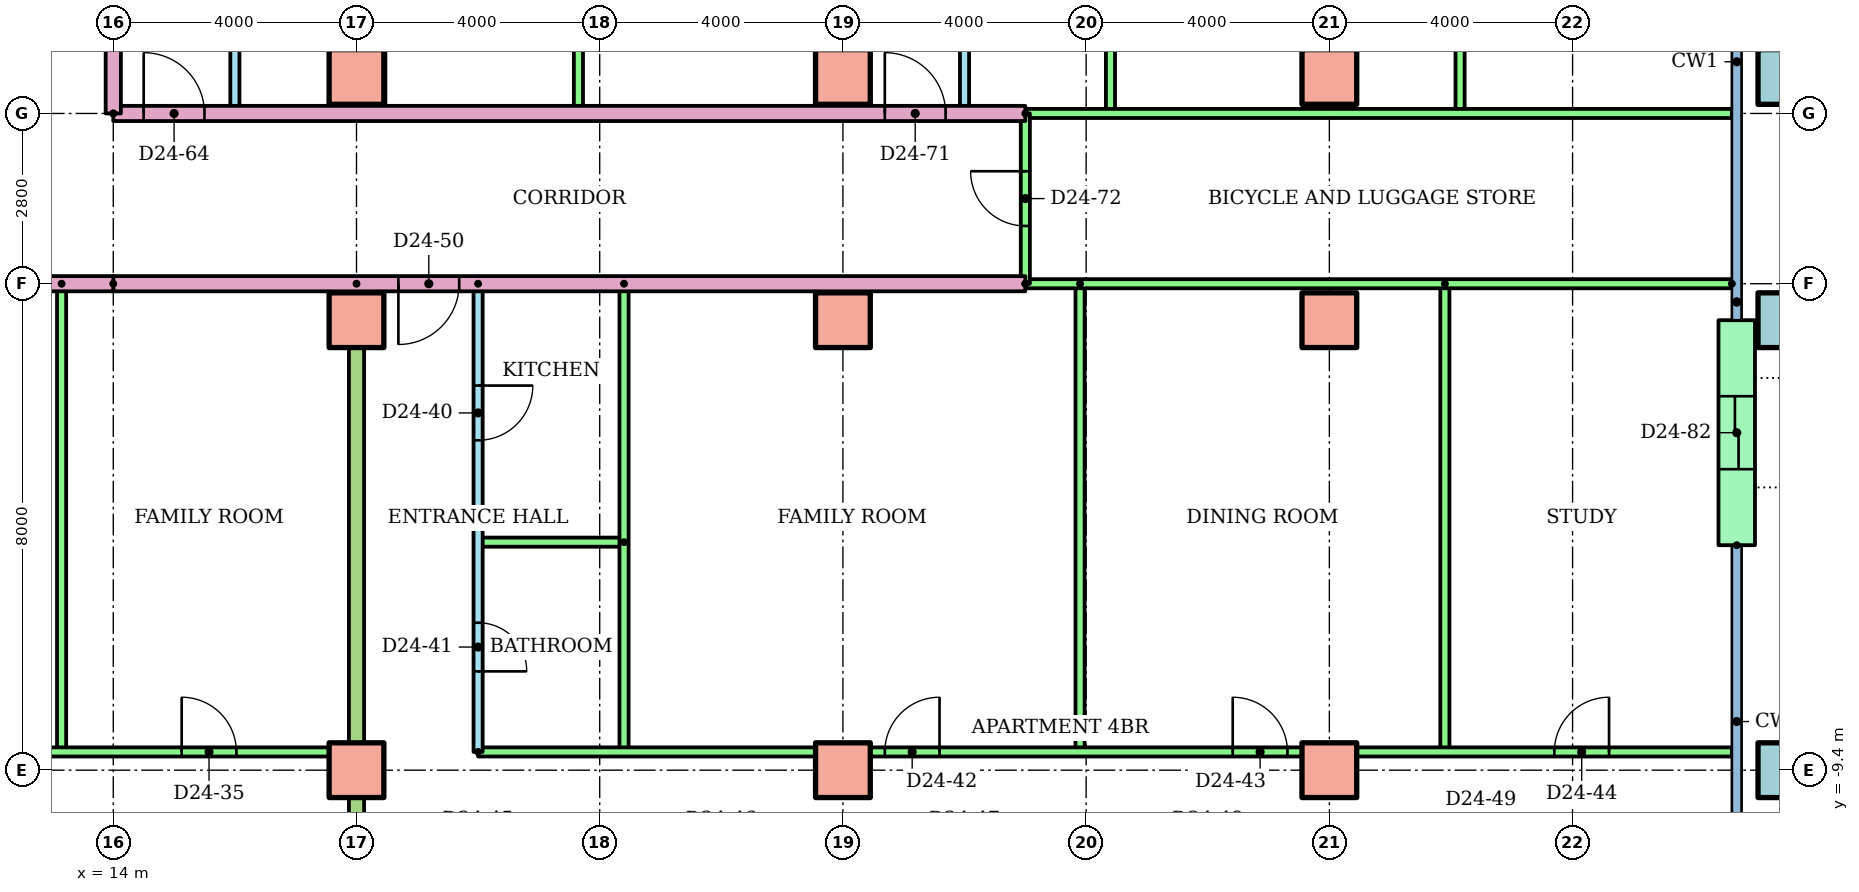
"""IFC4 building model, lengths in metres.
Left out: names, types, materials, properties, quantities, classifications, styles, units other than length and angle.
Written with IfcOpenShell. Run it as: python <this file> out.ifc"""

import sys

from ifc_helpers import new_model, si_unit, direction, frame, frame_2d, origin, origin_2d, place, context, subcontext, project, spatial, rectangle, hollow_rectangle, extrude, element, fill, save


model = new_model("IFC4")
c1 = context("Model", 3, precision=1e-05, world=origin(), true_north=direction((0.0, 1.0)))
c2 = subcontext(c1, "Body", "Model", "MODEL_VIEW")
j1 = project(units=[si_unit("LENGTHUNIT", "METRE"), si_unit("PLANEANGLEUNIT", "RADIAN")], contexts=[c1])
p1 = place(None, origin())
s1 = spatial("IfcSite", under=j1, at=p1, CompositionType="ELEMENT")
p2 = place(p1, origin())
s2 = spatial("IfcBuilding", under=s1, at=p2, CompositionType="ELEMENT")
p3 = place(p2, frame((0.0, 0.0, 93.5)))
s3 = spatial("IfcBuildingStorey", under=s2, at=p3, CompositionType="ELEMENT", Elevation=93.5)
for number, where in (
    (1, (18.0, -9.4, 0.0)),
    (2, (26.0, -9.4, 0.0)),
    (3, (34.0, -9.4, 0.0)),
):
    element("IfcColumn", number, at=place(p3, frame(where)), inside=s3, PredefinedType="COLUMN", context=c2, shape_type="SweptSolid", body=[
        extrude(rectangle(XDim=0.9, YDim=0.9, at=origin_2d()), origin(), (0.0, 0.0, 1.0), 3.2),
    ])
p4 = place(p3, frame((41.5, -9.4, 0.0)))
e4 = element("IfcColumn", 4, at=p4, inside=s3, PredefinedType="COLUMN", context=c2, shape_type="SweptSolid", body=[
    extrude(hollow_rectangle(XDim=0.9, YDim=0.9, WallThickness=0.045, at=origin_2d()), origin(), (0.0, 0.0, 1.0), 3.2),
])
for number, where in (
    (5, (18.0, -2.0, 0.0)),
    (6, (26.0, -2.0, 0.0)),
    (7, (34.0, -2.0, 0.0)),
):
    element("IfcColumn", number, at=place(p3, frame(where)), inside=s3, PredefinedType="COLUMN", context=c2, shape_type="SweptSolid", body=[
        extrude(rectangle(XDim=0.9, YDim=0.9, at=origin_2d()), origin(), (0.0, 0.0, 1.0), 3.2),
    ])
p5 = place(p3, frame((41.5, -2.0, 0.0)))
e8 = element("IfcColumn", 8, at=p5, inside=s3, PredefinedType="COLUMN", context=c2, shape_type="SweptSolid", body=[
    extrude(hollow_rectangle(XDim=0.9, YDim=0.9, WallThickness=0.045, at=origin_2d()), origin(), (0.0, 0.0, 1.0), 3.2),
])
for number, where in (
    (9, (18.0, 2.0, 0.0)),
    (10, (26.0, 2.0, 0.0)),
    (11, (34.0, 2.0, 0.0)),
):
    element("IfcColumn", number, at=place(p3, frame(where)), inside=s3, PredefinedType="COLUMN", context=c2, shape_type="SweptSolid", body=[
        extrude(rectangle(XDim=0.9, YDim=0.9, at=origin_2d()), origin(), (0.0, 0.0, 1.0), 3.2),
    ])
p6 = place(p3, frame((41.5, 2.0, 0.0)))
e12 = element("IfcColumn", 12, at=p6, inside=s3, PredefinedType="COLUMN", context=c2, shape_type="SweptSolid", body=[
    extrude(hollow_rectangle(XDim=0.9, YDim=0.9, WallThickness=0.045, at=origin_2d()), origin(), (0.0, 0.0, 1.0), 3.2),
])
p7 = place(p3, frame((40.7, -5.7, 0.0), z_axis=(0.0, 0.0, 1.0), x_axis=(0.0, 1.0, 0.0)))
e13 = element("IfcWall", 13, at=p7, inside=s3, PredefinedType="STANDARD", context=c2, shape_type="SweptSolid", body=[
    extrude(rectangle(XDim=3.7, YDim=0.6, at=frame_2d((1.85, 0.0))), origin(), (0.0, 0.0, 1.0), 2.92),
])
p8 = place(p7, frame((1.25, 0.0, 0.0)))
e14 = element("IfcOpeningElement", 14, at=p8, cuts=e13, PredefinedType="OPENING", context=c2, shape_type="SweptSolid", body=[
    extrude(rectangle(XDim=1.2, YDim=2.1, at=frame_2d((0.6, 1.05))), frame((0.0, 0.31, 0.0), z_axis=(0.0, -1.0, 0.0), x_axis=(1.0, 0.0, 0.0)), (0.0, 0.0, 1.0), 0.62),
])
p9 = place(p3, frame((13.15, -1.4, 0.0), z_axis=(0.0, 0.0, 1.0), x_axis=(0.0, -1.0, 0.0)))
e15 = element("IfcWall", 15, at=p9, inside=s3, PredefinedType="PARTITIONING", context=c2, shape_type="SweptSolid", body=[
    extrude(rectangle(XDim=7.7, YDim=0.15, at=frame_2d((3.85, 0.0))), origin(), (0.0, 0.0, 1.0), 2.4),
])
p10 = place(p3, frame((4.0, -9.1, 0.0)))
e16 = element("IfcWall", 16, at=p10, inside=s3, PredefinedType="PARTITIONING", context=c2, shape_type="SweptSolid", body=[
    extrude(rectangle(XDim=14.0, YDim=0.15, at=frame_2d((7.0, 0.0))), origin(), (0.0, 0.0, 1.0), 2.4),
])
p11 = place(p10, frame((3.45, 0.0, 0.0)))
e17 = element("IfcOpeningElement", 17, at=p11, cuts=e16, PredefinedType="OPENING", context=c2, shape_type="SweptSolid", body=[
    extrude(rectangle(XDim=0.9, YDim=2.1, at=frame_2d((0.45, 1.05))), frame((0.0, 0.085, 0.0), z_axis=(0.0, -1.0, 0.0), x_axis=(1.0, 0.0, 0.0)), (0.0, 0.0, 1.0), 0.17),
])
p12 = place(p10, frame((6.825, 0.0, 0.0)))
e18 = element("IfcOpeningElement", 18, at=p12, cuts=e16, PredefinedType="OPENING", context=c2, shape_type="SweptSolid", body=[
    extrude(rectangle(XDim=0.9, YDim=2.1, at=frame_2d((0.45, 1.05))), frame((0.0, 0.085, 0.0), z_axis=(0.0, -1.0, 0.0), x_axis=(1.0, 0.0, 0.0)), (0.0, 0.0, 1.0), 0.17),
])
p13 = place(p10, frame((11.125, 0.0, 0.0)))
e19 = element("IfcOpeningElement", 19, at=p13, cuts=e16, PredefinedType="OPENING", context=c2, shape_type="SweptSolid", body=[
    extrude(rectangle(XDim=0.9, YDim=2.1, at=frame_2d((0.45, 1.05))), frame((0.0, 0.085, 0.0), z_axis=(0.0, -1.0, 0.0), x_axis=(1.0, 0.0, 0.0)), (0.0, 0.0, 1.0), 0.17),
])
p14 = place(p3, frame((20.0, -1.4, 0.0), z_axis=(0.0, 0.0, 1.0), x_axis=(0.0, -1.0, 0.0)))
e20 = element("IfcWall", 20, at=p14, inside=s3, PredefinedType="PARTITIONING", context=c2, shape_type="SweptSolid", body=[
    extrude(rectangle(XDim=7.7, YDim=0.15, at=frame_2d((3.85, 0.0))), origin(), (0.0, 0.0, 1.0), 2.4),
])
p15 = place(p14, frame((1.675, 0.0, 0.0)))
e21 = element("IfcOpeningElement", 21, at=p15, cuts=e20, PredefinedType="OPENING", context=c2, shape_type="SweptSolid", body=[
    extrude(rectangle(XDim=0.9, YDim=2.1, at=frame_2d((0.45, 1.05))), frame((0.0, 0.085, 0.0), z_axis=(0.0, -1.0, 0.0), x_axis=(1.0, 0.0, 0.0)), (0.0, 0.0, 1.0), 0.17),
])
p16 = place(p14, frame((5.575, 0.0, 0.0)))
e22 = element("IfcOpeningElement", 22, at=p16, cuts=e20, PredefinedType="OPENING", context=c2, shape_type="SweptSolid", body=[
    extrude(rectangle(XDim=0.8, YDim=2.1, at=frame_2d((0.4, 1.05))), frame((0.0, 0.085, 0.0), z_axis=(0.0, -1.0, 0.0), x_axis=(1.0, 0.0, 0.0)), (0.0, 0.0, 1.0), 0.17),
])
p17 = place(p3, frame((22.4, -5.65, 0.0), z_axis=(0.0, 0.0, 1.0), x_axis=(-1.0, 0.0, 0.0)))
e23 = element("IfcWall", 23, at=p17, inside=s3, PredefinedType="PARTITIONING", context=c2, shape_type="SweptSolid", body=[
    extrude(rectangle(XDim=2.4, YDim=0.15, at=frame_2d((1.2, 0.0))), origin(), (0.0, 0.0, 1.0), 2.4),
])
for number, where, z_axis, x_axis in (
    (24, (22.4, -1.4, 0.0), (0.0, 0.0, 1.0), (0.0, -1.0, 0.0)),
    (25, (29.9, -1.4, 0.0), (0.0, 0.0, 1.0), (0.0, -1.0, 0.0)),
    (26, (35.9, -1.4, 0.0), (0.0, 0.0, 1.0), (0.0, -1.0, 0.0)),
):
    element("IfcWall", number, at=place(p3, frame(where, z_axis=z_axis, x_axis=x_axis)), inside=s3, PredefinedType="PARTITIONING", context=c2, shape_type="SweptSolid", body=[
        extrude(rectangle(XDim=7.7, YDim=0.15, at=frame_2d((3.85, 0.0))), origin(), (0.0, 0.0, 1.0), 2.4),
    ])
p18 = place(p3, frame((20.0, -9.1, 0.0)))
e27 = element("IfcWall", 27, at=p18, inside=s3, PredefinedType="PARTITIONING", context=c2, shape_type="SweptSolid", body=[
    extrude(rectangle(XDim=20.62, YDim=0.15, at=frame_2d((10.31, 0.0))), origin(), (0.0, 0.0, 1.0), 2.4),
])
p19 = place(p18, frame((6.689, 0.0, 0.0)))
e28 = element("IfcOpeningElement", 28, at=p19, cuts=e27, PredefinedType="OPENING", context=c2, shape_type="SweptSolid", body=[
    extrude(rectangle(XDim=0.9, YDim=2.1, at=frame_2d((0.45, 1.05))), frame((0.0, 0.085, 0.0), z_axis=(0.0, -1.0, 0.0), x_axis=(1.0, 0.0, 0.0)), (0.0, 0.0, 1.0), 0.17),
])
p20 = place(p18, frame((12.411, 0.0, 0.0)))
e29 = element("IfcOpeningElement", 29, at=p20, cuts=e27, PredefinedType="OPENING", context=c2, shape_type="SweptSolid", body=[
    extrude(rectangle(XDim=0.9, YDim=2.1, at=frame_2d((0.45, 1.05))), frame((0.0, 0.085, 0.0), z_axis=(0.0, -1.0, 0.0), x_axis=(1.0, 0.0, 0.0)), (0.0, 0.0, 1.0), 0.17),
])
p21 = place(p18, frame((17.7, 0.0, 0.0)))
e30 = element("IfcOpeningElement", 30, at=p21, cuts=e27, PredefinedType="OPENING", context=c2, shape_type="SweptSolid", body=[
    extrude(rectangle(XDim=0.9, YDim=2.1, at=frame_2d((0.45, 1.05))), frame((0.0, 0.085, 0.0), z_axis=(0.0, -1.0, 0.0), x_axis=(1.0, 0.0, 0.0)), (0.0, 0.0, 1.0), 0.17),
])
p22 = place(p3, frame((18.0, -1.4, 0.0), z_axis=(0.0, 0.0, 1.0), x_axis=(0.0, -1.0, 0.0)))
e31 = element("IfcWall", 31, at=p22, inside=s3, PredefinedType="PARTITIONING", context=c2, shape_type="SweptSolid", body=[
    extrude(rectangle(XDim=14.81, YDim=0.25, at=frame_2d((7.405, 0.0))), origin(), (0.0, 0.0, 1.0), 2.4),
])
p23 = place(p3, frame((29.0, -1.4, 0.0), z_axis=(0.0, 0.0, 1.0), x_axis=(-1.0, 0.0, 0.0)))
e32 = element("IfcWall", 32, at=p23, inside=s3, PredefinedType="PARTITIONING", context=c2, shape_type="SweptSolid", body=[
    extrude(rectangle(XDim=15.0, YDim=0.25, at=frame_2d((7.5, 0.0))), origin(), (0.0, 0.0, 1.0), 2.4),
])
p24 = place(p23, frame((9.311, 0.0, 0.0)))
e33 = element("IfcOpeningElement", 33, at=p24, cuts=e32, PredefinedType="OPENING", context=c2, shape_type="SweptSolid", body=[
    extrude(rectangle(XDim=1.0, YDim=2.1, at=frame_2d((0.5, 1.05))), frame((0.0, 0.135, 0.0), z_axis=(0.0, -1.0, 0.0), x_axis=(1.0, 0.0, 0.0)), (0.0, 0.0, 1.0), 0.27),
])
p25 = place(p3, frame((40.62, -1.4, 0.0), z_axis=(0.0, 0.0, 1.0), x_axis=(-1.0, 0.0, 0.0)))
e34 = element("IfcWall", 34, at=p25, inside=s3, PredefinedType="PARTITIONING", context=c2, shape_type="SweptSolid", body=[
    extrude(rectangle(XDim=11.62, YDim=0.15, at=frame_2d((5.81, 0.0))), origin(), (0.0, 0.0, 1.0), 2.4),
])
p26 = place(p3, frame((16.0, 11.5, 0.0), z_axis=(0.0, 0.0, 1.0), x_axis=(0.0, -1.0, 0.0)))
e35 = element("IfcWall", 35, at=p26, inside=s3, PredefinedType="PARTITIONING", context=c2, shape_type="SweptSolid", body=[
    extrude(rectangle(XDim=10.1, YDim=0.15, at=frame_2d((5.05, 0.0))), origin(), (0.0, 0.0, 1.0), 2.4),
])
p27 = place(p26, frame((6.9, 0.0, 0.0)))
e36 = element("IfcOpeningElement", 36, at=p27, cuts=e35, PredefinedType="OPENING", context=c2, shape_type="SweptSolid", body=[
    extrude(rectangle(XDim=0.9, YDim=2.1, at=frame_2d((0.45, 1.05))), frame((0.0, 0.085, 0.0), z_axis=(0.0, -1.0, 0.0), x_axis=(1.0, 0.0, 0.0)), (0.0, 0.0, 1.0), 0.17),
])
p28 = place(p26, frame((1.9, 0.0, 0.0)))
e37 = element("IfcOpeningElement", 37, at=p28, cuts=e35, PredefinedType="OPENING", context=c2, shape_type="SweptSolid", body=[
    extrude(rectangle(XDim=0.8, YDim=2.1, at=frame_2d((0.4, 1.05))), frame((0.0, 0.085, 0.0), z_axis=(0.0, -1.0, 0.0), x_axis=(1.0, 0.0, 0.0)), (0.0, 0.0, 1.0), 0.17),
])
for number, where, z_axis, x_axis in (
    (38, (18.4, 11.5, 0.0), (0.0, 0.0, 1.0), (0.0, -1.0, 0.0)),
    (39, (21.65, 11.5, 0.0), (0.0, 0.0, 1.0), (0.0, -1.0, 0.0)),
):
    element("IfcWall", number, at=place(p3, frame(where, z_axis=z_axis, x_axis=x_axis)), inside=s3, PredefinedType="PARTITIONING", context=c2, shape_type="SweptSolid", body=[
        extrude(rectangle(XDim=10.1, YDim=0.15, at=frame_2d((5.05, 0.0))), origin(), (0.0, 0.0, 1.0), 2.4),
    ])
p29 = place(p3, frame((28.0, 11.5, 0.0), z_axis=(0.0, 0.0, 1.0), x_axis=(0.0, -1.0, 0.0)))
e40 = element("IfcWall", 40, at=p29, inside=s3, PredefinedType="PARTITIONING", context=c2, shape_type="SweptSolid", body=[
    extrude(rectangle(XDim=10.1, YDim=0.15, at=frame_2d((5.05, 0.0))), origin(), (0.0, 0.0, 1.0), 2.4),
])
p30 = place(p29, frame((6.9, 0.0, 0.0)))
e41 = element("IfcOpeningElement", 41, at=p30, cuts=e40, PredefinedType="OPENING", context=c2, shape_type="SweptSolid", body=[
    extrude(rectangle(XDim=0.9, YDim=2.1, at=frame_2d((0.45, 1.05))), frame((0.0, 0.085, 0.0), z_axis=(0.0, -1.0, 0.0), x_axis=(1.0, 0.0, 0.0)), (0.0, 0.0, 1.0), 0.17),
])
p31 = place(p29, frame((1.9, 0.0, 0.0)))
e42 = element("IfcOpeningElement", 42, at=p31, cuts=e40, PredefinedType="OPENING", context=c2, shape_type="SweptSolid", body=[
    extrude(rectangle(XDim=0.8, YDim=2.1, at=frame_2d((0.4, 1.05))), frame((0.0, 0.085, 0.0), z_axis=(0.0, -1.0, 0.0), x_axis=(1.0, 0.0, 0.0)), (0.0, 0.0, 1.0), 0.17),
])
for number, where, z_axis, x_axis in (
    (43, (30.4, 11.5, 0.0), (0.0, 0.0, 1.0), (0.0, -1.0, 0.0)),
    (44, (36.15, 11.5, 0.0), (0.0, 0.0, 1.0), (0.0, -1.0, 0.0)),
):
    element("IfcWall", number, at=place(p3, frame(where, z_axis=z_axis, x_axis=x_axis)), inside=s3, PredefinedType="PARTITIONING", context=c2, shape_type="SweptSolid", body=[
        extrude(rectangle(XDim=10.1, YDim=0.15, at=frame_2d((5.05, 0.0))), origin(), (0.0, 0.0, 1.0), 2.4),
    ])
p32 = place(p3, frame((26.0, 18.621, 0.0), z_axis=(0.0, 0.0, 1.0), x_axis=(0.0, -1.0, 0.0)))
e45 = element("IfcWall", 45, at=p32, inside=s3, PredefinedType="PARTITIONING", context=c2, shape_type="SweptSolid", body=[
    extrude(rectangle(XDim=17.221, YDim=0.25, at=frame_2d((8.611, 0.0))), origin(), (0.0, 0.0, 1.0), 2.4),
])
p33 = place(p3, frame((14.0, 1.4, 0.0)))
e46 = element("IfcWall", 46, at=p33, inside=s3, PredefinedType="PARTITIONING", context=c2, shape_type="SweptSolid", body=[
    extrude(rectangle(XDim=15.0, YDim=0.25, at=frame_2d((7.5, 0.0))), origin(), (0.0, 0.0, 1.0), 2.4),
])
p34 = place(p33, frame((0.5, 0.0, 0.0)))
e47 = element("IfcOpeningElement", 47, at=p34, cuts=e46, PredefinedType="OPENING", context=c2, shape_type="SweptSolid", body=[
    extrude(rectangle(XDim=1.0, YDim=2.1, at=frame_2d((0.5, 1.05))), frame((0.0, 0.135, 0.0), z_axis=(0.0, -1.0, 0.0), x_axis=(1.0, 0.0, 0.0)), (0.0, 0.0, 1.0), 0.27),
])
p35 = place(p33, frame((12.689, 0.0, 0.0)))
e48 = element("IfcOpeningElement", 48, at=p35, cuts=e46, PredefinedType="OPENING", context=c2, shape_type="SweptSolid", body=[
    extrude(rectangle(XDim=1.0, YDim=2.1, at=frame_2d((0.5, 1.05))), frame((0.0, 0.135, 0.0), z_axis=(0.0, -1.0, 0.0), x_axis=(1.0, 0.0, 0.0)), (0.0, 0.0, 1.0), 0.27),
])
p36 = place(p3, frame((29.0, 1.4, 0.0)))
e49 = element("IfcWall", 49, at=p36, inside=s3, PredefinedType="PARTITIONING", context=c2, shape_type="SweptSolid", body=[
    extrude(rectangle(XDim=11.62, YDim=0.15, at=frame_2d((5.81, 0.0))), origin(), (0.0, 0.0, 1.0), 2.4),
])
p37 = place(p3, frame((29.0, -1.4, 0.0), z_axis=(0.0, 0.0, 1.0), x_axis=(0.0, 1.0, 0.0)))
e50 = element("IfcWall", 50, at=p37, inside=s3, PredefinedType="PARTITIONING", context=c2, shape_type="SweptSolid", body=[
    extrude(rectangle(XDim=2.8, YDim=0.15, at=frame_2d((1.4, 0.0))), origin(), (0.0, 0.0, 1.0), 2.4),
])
p38 = place(p37, frame((0.95, 0.0, 0.0)))
e51 = element("IfcOpeningElement", 51, at=p38, cuts=e50, PredefinedType="OPENING", context=c2, shape_type="SweptSolid", body=[
    extrude(rectangle(XDim=0.9, YDim=2.1, at=frame_2d((0.45, 1.05))), frame((0.0, 0.085, 0.0), z_axis=(0.0, -1.0, 0.0), x_axis=(1.0, 0.0, 0.0)), (0.0, 0.0, 1.0), 0.17),
])
p39 = place(p3, frame((14.0, -1.4, 0.0), z_axis=(0.0, 0.0, 1.0), x_axis=(-1.0, 0.0, 0.0)))
e52 = element("IfcWall", 52, at=p39, inside=s3, PredefinedType="PARTITIONING", context=c2, shape_type="SweptSolid", body=[
    extrude(rectangle(XDim=28.0, YDim=0.25, at=frame_2d((14.0, 0.0))), origin(), (0.0, 0.0, 1.0), 2.4),
])
p40 = place(p39, frame((12.689, 0.0, 0.0)))
e53 = element("IfcOpeningElement", 53, at=p40, cuts=e52, PredefinedType="OPENING", context=c2, shape_type="SweptSolid", body=[
    extrude(rectangle(XDim=1.0, YDim=2.1, at=frame_2d((0.5, 1.05))), frame((0.0, 0.135, 0.0), z_axis=(0.0, -1.0, 0.0), x_axis=(1.0, 0.0, 0.0)), (0.0, 0.0, 1.0), 0.27),
])
p41 = place(p39, frame((10.311, 0.0, 0.0)))
e54 = element("IfcOpeningElement", 54, at=p41, cuts=e52, PredefinedType="OPENING", context=c2, shape_type="SweptSolid", body=[
    extrude(rectangle(XDim=1.0, YDim=2.1, at=frame_2d((0.5, 1.05))), frame((0.0, 0.135, 0.0), z_axis=(0.0, -1.0, 0.0), x_axis=(1.0, 0.0, 0.0)), (0.0, 0.0, 1.0), 0.27),
])
p42 = place(p3, frame((14.0, 1.4, 0.0), z_axis=(0.0, 0.0, 1.0), x_axis=(0.0, 1.0, 0.0)))
e55 = element("IfcWall", 55, at=p42, inside=s3, PredefinedType="PARTITIONING", context=c2, shape_type="SweptSolid", body=[
    extrude(rectangle(XDim=1.6, YDim=0.25, at=frame_2d((0.8, 0.0))), origin(), (0.0, 0.0, 1.0), 2.4),
])
p43 = place(p13, origin())
e56 = element("IfcDoor", 56, at=p43, inside=s3, OperationType="SINGLE_SWING_LEFT", PredefinedType="DOOR", context=c2, shape_type="SweptSolid", body=[
    extrude(rectangle(XDim=0.9, YDim=2.1, at=frame_2d((0.45, 1.05))), frame((0.0, 0.025, 0.0), z_axis=(0.0, -1.0, 0.0), x_axis=(1.0, 0.0, 0.0)), (0.0, 0.0, 1.0), 0.05),
])
fill(e19, e56)
p44 = place(p15, origin())
e57 = element("IfcDoor", 57, at=p44, inside=s3, OperationType="SINGLE_SWING_LEFT", PredefinedType="DOOR", context=c2, shape_type="SweptSolid", body=[
    extrude(rectangle(XDim=0.9, YDim=2.1, at=frame_2d((0.45, 1.05))), frame((0.0, 0.025, 0.0), z_axis=(0.0, -1.0, 0.0), x_axis=(1.0, 0.0, 0.0)), (0.0, 0.0, 1.0), 0.05),
])
fill(e21, e57)
p45 = place(p16, origin())
e58 = element("IfcDoor", 58, at=p45, inside=s3, OperationType="SINGLE_SWING_RIGHT", PredefinedType="DOOR", context=c2, shape_type="SweptSolid", body=[
    extrude(rectangle(XDim=0.8, YDim=2.1, at=frame_2d((0.4, 1.05))), frame((0.0, 0.025, 0.0), z_axis=(0.0, -1.0, 0.0), x_axis=(1.0, 0.0, 0.0)), (0.0, 0.0, 1.0), 0.05),
])
fill(e22, e58)
p46 = place(p19, origin())
e59 = element("IfcDoor", 59, at=p46, inside=s3, OperationType="SINGLE_SWING_RIGHT", PredefinedType="DOOR", context=c2, shape_type="SweptSolid", body=[
    extrude(rectangle(XDim=0.9, YDim=2.1, at=frame_2d((0.45, 1.05))), frame((0.0, 0.025, 0.0), z_axis=(0.0, -1.0, 0.0), x_axis=(1.0, 0.0, 0.0)), (0.0, 0.0, 1.0), 0.05),
])
fill(e28, e59)
p47 = place(p20, origin())
e60 = element("IfcDoor", 60, at=p47, inside=s3, OperationType="SINGLE_SWING_LEFT", PredefinedType="DOOR", context=c2, shape_type="SweptSolid", body=[
    extrude(rectangle(XDim=0.9, YDim=2.1, at=frame_2d((0.45, 1.05))), frame((0.0, 0.025, 0.0), z_axis=(0.0, -1.0, 0.0), x_axis=(1.0, 0.0, 0.0)), (0.0, 0.0, 1.0), 0.05),
])
fill(e29, e60)
p48 = place(p21, origin())
e61 = element("IfcDoor", 61, at=p48, inside=s3, OperationType="SINGLE_SWING_RIGHT", PredefinedType="DOOR", context=c2, shape_type="SweptSolid", body=[
    extrude(rectangle(XDim=0.9, YDim=2.1, at=frame_2d((0.45, 1.05))), frame((0.0, 0.025, 0.0), z_axis=(0.0, -1.0, 0.0), x_axis=(1.0, 0.0, 0.0)), (0.0, 0.0, 1.0), 0.05),
])
fill(e30, e61)
p49 = place(p24, origin())
e62 = element("IfcDoor", 62, at=p49, inside=s3, OperationType="SINGLE_SWING_RIGHT", PredefinedType="DOOR", context=c2, shape_type="SweptSolid", body=[
    extrude(rectangle(XDim=1.0, YDim=2.1, at=frame_2d((0.5, 1.05))), frame((0.0, 0.025, 0.0), z_axis=(0.0, -1.0, 0.0), x_axis=(1.0, 0.0, 0.0)), (0.0, 0.0, 1.0), 0.05),
])
fill(e33, e62)
p50 = place(p34, origin())
e63 = element("IfcDoor", 63, at=p50, inside=s3, OperationType="SINGLE_SWING_LEFT", PredefinedType="DOOR", context=c2, shape_type="SweptSolid", body=[
    extrude(rectangle(XDim=1.0, YDim=2.1, at=frame_2d((0.5, 1.05))), frame((0.0, 0.025, 0.0), z_axis=(0.0, -1.0, 0.0), x_axis=(1.0, 0.0, 0.0)), (0.0, 0.0, 1.0), 0.05),
])
fill(e47, e63)
p51 = place(p35, origin())
e64 = element("IfcDoor", 64, at=p51, inside=s3, OperationType="SINGLE_SWING_LEFT", PredefinedType="DOOR", context=c2, shape_type="SweptSolid", body=[
    extrude(rectangle(XDim=1.0, YDim=2.1, at=frame_2d((0.5, 1.05))), frame((0.0, 0.025, 0.0), z_axis=(0.0, -1.0, 0.0), x_axis=(1.0, 0.0, 0.0)), (0.0, 0.0, 1.0), 0.05),
])
fill(e48, e64)
p52 = place(p38, origin())
e65 = element("IfcDoor", 65, at=p52, inside=s3, OperationType="SINGLE_SWING_RIGHT", PredefinedType="DOOR", context=c2, shape_type="SweptSolid", body=[
    extrude(rectangle(XDim=0.9, YDim=2.1, at=frame_2d((0.45, 1.05))), frame((0.0, 0.025, 0.0), z_axis=(0.0, -1.0, 0.0), x_axis=(1.0, 0.0, 0.0)), (0.0, 0.0, 1.0), 0.05),
])
fill(e51, e65)
p53 = place(p8, origin())
e66 = element("IfcDoor", 66, at=p53, inside=s3, OperationType="SLIDING_TO_LEFT", PredefinedType="DOOR", context=c2, shape_type="SweptSolid", body=[
    extrude(rectangle(XDim=1.2, YDim=2.1, at=frame_2d((0.6, 1.05))), frame((0.0, 0.025, 0.0), z_axis=(0.0, -1.0, 0.0), x_axis=(1.0, 0.0, 0.0)), (0.0, 0.0, 1.0), 0.05),
])
fill(e14, e66)
save(model, sys.argv[1])
